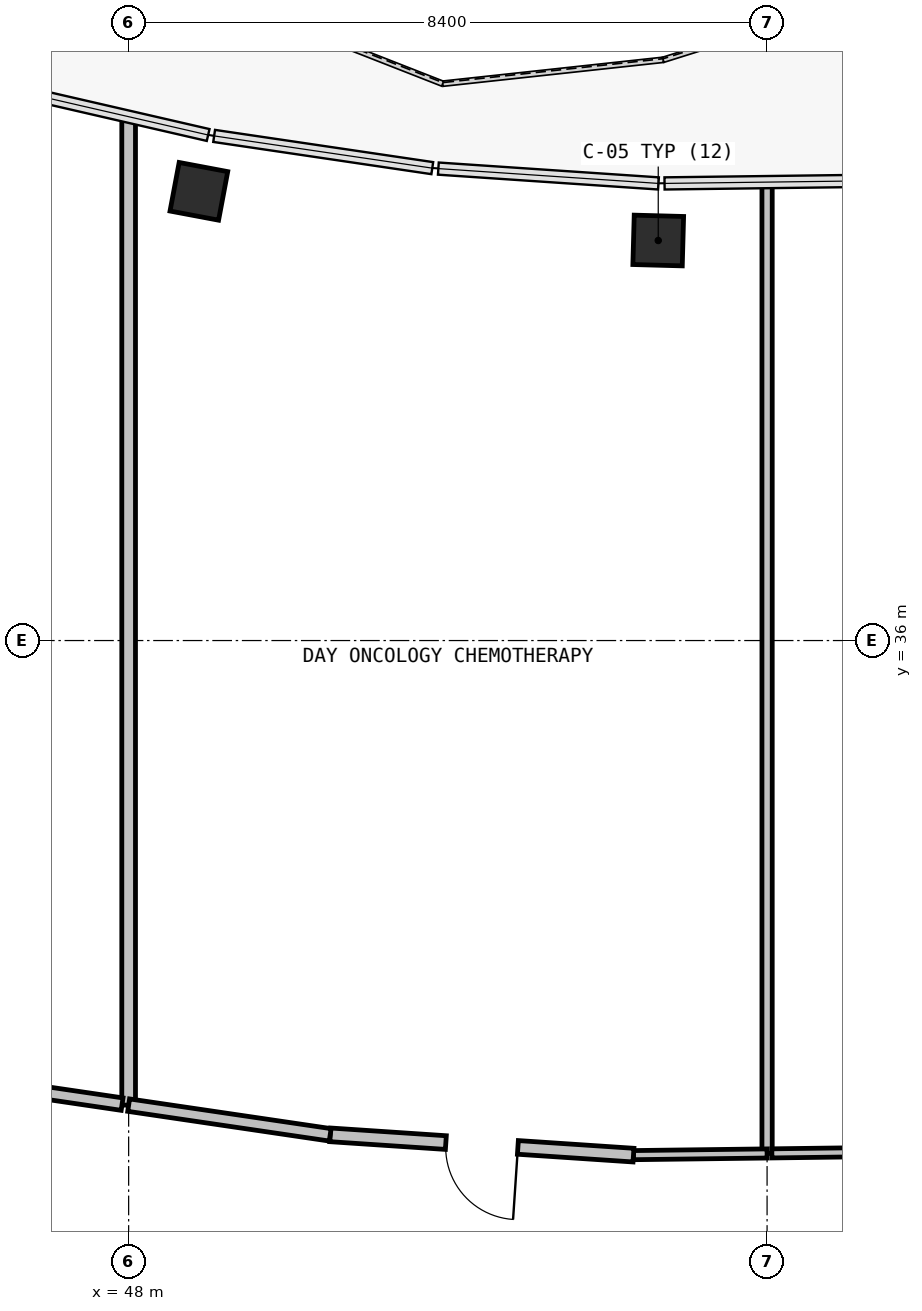
"""IFC4 building model, lengths in metres.
Left out: names, types, materials, properties, quantities, classifications, styles, units other than length and angle.
Written with IfcOpenShell. Run it as: python <this file> out.ifc"""

import sys

from ifc_helpers import new_model, si_unit, direction, frame, frame_2d, origin, origin_2d, place, context, subcontext, project, spatial, rectangle, extrude, element, fill, save


model = new_model("IFC4")
c1 = context("Model", 3, precision=1e-05, world=origin(), true_north=direction((0.0, 1.0)))
c2 = subcontext(c1, "Body", "Model", "MODEL_VIEW")
j1 = project(units=[si_unit("LENGTHUNIT", "METRE"), si_unit("PLANEANGLEUNIT", "RADIAN")], contexts=[c1])
p1 = place(None, origin())
s1 = spatial("IfcSite", under=j1, at=p1, CompositionType="ELEMENT")
p2 = place(p1, origin())
s2 = spatial("IfcBuilding", under=s1, at=p2, CompositionType="ELEMENT")
p3 = place(p2, frame((0.0, 0.0, 15.0)))
s3 = spatial("IfcBuildingStorey", under=s2, at=p3, CompositionType="ELEMENT", Elevation=15.0)
for number, where, z_axis, x_axis in (
    (1, (48.924, 41.91, 0.0), (0.0, 0.0, 1.0), (0.185, 0.983, 0.0)),
    (2, (54.968, 41.263, 0.0), (0.0, 0.0, 1.0), (0.027, 1.0, 0.0)),
):
    element("IfcColumn", number, at=place(p3, frame(where, z_axis=z_axis, x_axis=x_axis)), inside=s3, PredefinedType="COLUMN", context=c2, shape_type="SweptSolid", body=[
        extrude(rectangle(XDim=0.65, YDim=0.65, at=origin_2d()), origin(), (0.0, 0.0, 1.0), 3.91),
    ])
p4 = place(p3, frame((48.0, 42.881, 0.0), z_axis=(0.0, 0.0, 1.0), x_axis=(0.0, -1.0, 0.0)))
e3 = element("IfcWall", 3, at=p4, inside=s3, PredefinedType="PARTITIONING", context=c2, shape_type="SweptSolid", body=[
    extrude(rectangle(XDim=12.993, YDim=0.18, at=frame_2d((6.497, 0.0))), origin(), (0.0, 0.0, 1.0), 3.21),
])
p5 = place(p3, frame((47.914, 29.901, 0.0), z_axis=(0.0, 0.0, 1.0), x_axis=(-0.989333072423, 0.145671108357, 0.0)))
e4 = element("IfcWall", 4, at=p5, inside=s3, PredefinedType="PARTITIONING", context=c2, shape_type="SweptSolid", body=[
    extrude(rectangle(XDim=1.23, YDim=0.165, at=frame_2d((0.615, 0.0))), origin(), (0.0, 0.0, 1.0), 3.895),
])
p6 = place(p3, frame((56.4, 42.02, 0.0), z_axis=(0.0, 0.0, 1.0), x_axis=(0.0, -1.0, 0.0)))
e5 = element("IfcWall", 5, at=p6, inside=s3, PredefinedType="PARTITIONING", context=c2, shape_type="SweptSolid", body=[
    extrude(rectangle(XDim=12.768, YDim=0.135, at=frame_2d((6.384, 0.0))), origin(), (0.0, 0.0, 1.0), 3.895),
])
p7 = place(p3, frame((56.4, 29.252, 0.0), z_axis=(0.0, 0.0, 1.0), x_axis=(-0.999921884154, -0.012499023552, 0.0)))
e6 = element("IfcWall", 6, at=p7, inside=s3, PredefinedType="PARTITIONING", context=c2, shape_type="SweptSolid", body=[
    extrude(rectangle(XDim=1.758, YDim=0.12, at=frame_2d((0.879, 0.0))), origin(), (0.0, 0.0, 1.0), 3.895),
])
p8 = place(p3, frame((54.642, 29.23, 0.0), z_axis=(0.0, 0.0, 1.0), x_axis=(-0.99776702154, 0.06679049878, 0.0)))
e7 = element("IfcWall", 7, at=p8, inside=s3, PredefinedType="PARTITIONING", context=c2, shape_type="SweptSolid", body=[
    extrude(rectangle(XDim=3.999, YDim=0.18, at=frame_2d((2.0, 0.0))), origin(), (0.0, 0.0, 1.0), 3.895),
])
p9 = place(p8, frame((1.524, 0.0, 0.0)))
e8 = element("IfcOpeningElement", 8, at=p9, cuts=e7, PredefinedType="OPENING", context=c2, shape_type="SweptSolid", body=[
    extrude(rectangle(XDim=0.95, YDim=2.1, at=frame_2d((0.475, 1.05))), frame((0.0, 0.1, 0.0), z_axis=(0.0, -1.0, 0.0), x_axis=(1.0, 0.0, 0.0)), (0.0, 0.0, 1.0), 0.2),
])
p10 = place(p3, frame((50.652, 29.497, 0.0), z_axis=(0.0, 0.0, 1.0), x_axis=(-0.989313203243, 0.145805987148, 0.0)))
e9 = element("IfcWall", 9, at=p10, inside=s3, PredefinedType="PARTITIONING", context=c2, shape_type="SweptSolid", body=[
    extrude(rectangle(XDim=2.681, YDim=0.165, at=frame_2d((1.34, 0.0))), origin(), (0.0, 0.0, 1.0), 3.895),
])
p11 = place(p3, frame((58.639, 29.281, 0.0), z_axis=(0.0, 0.0, 1.0), x_axis=(-0.999916773113, -0.012901428128, 0.0)))
e10 = element("IfcWall", 10, at=p11, inside=s3, PredefinedType="PARTITIONING", context=c2, shape_type="SweptSolid", body=[
    extrude(rectangle(XDim=2.176, YDim=0.12, at=frame_2d((1.088, 0.0))), origin(), (0.0, 0.0, 1.0), 3.895),
])
p12 = place(p9, origin())
e11 = element("IfcDoor", 11, at=p12, inside=s3, OperationType="SINGLE_SWING_RIGHT", PredefinedType="DOOR", context=c2, shape_type="SweptSolid", body=[
    extrude(rectangle(XDim=0.95, YDim=2.1, at=frame_2d((0.475, 1.05))), frame((0.0, 0.025, 0.0), z_axis=(0.0, -1.0, 0.0), x_axis=(1.0, 0.0, 0.0)), (0.0, 0.0, 1.0), 0.05),
])
fill(e8, e11)
save(model, sys.argv[1])
